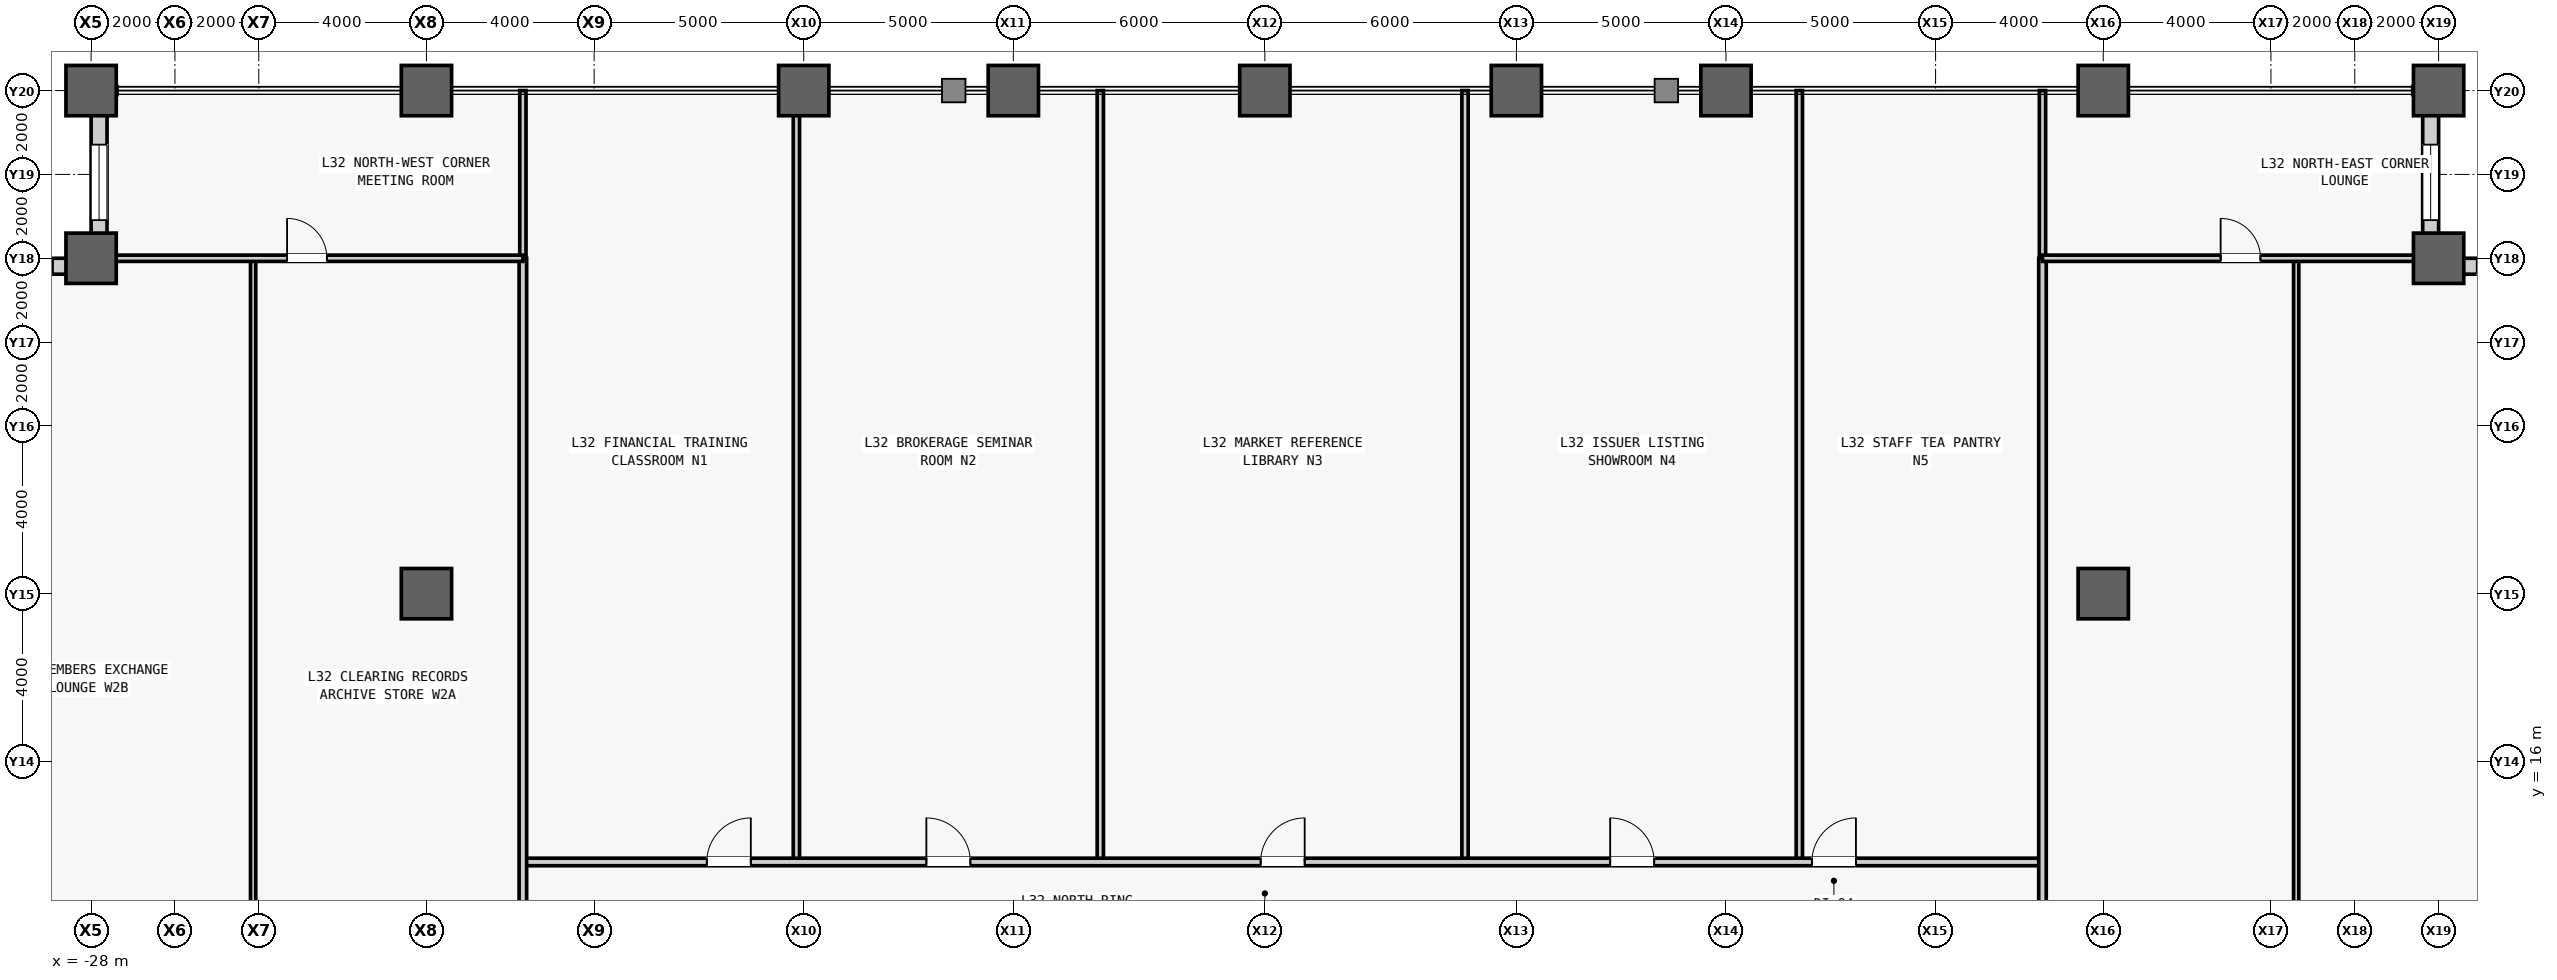
"""IFC4 building model, lengths in metres.
Left out: names, types, materials, properties, quantities, classifications, styles, units other than length and angle.
Written with IfcOpenShell. Run it as: python <this file> out.ifc"""

import sys

from ifc_helpers import new_model, si_unit, direction, frame, frame_2d, origin, origin_2d, place, context, subcontext, project, spatial, rectangle, hollow_rectangle, extrude, source, transform, mapped, element, fill, save


model = new_model("IFC4")
c1 = context("Model", 3, precision=1e-05, world=origin(), true_north=direction((0.0, 1.0)))
c2 = subcontext(c1, "Body", "Model", "MODEL_VIEW")
j1 = project(units=[si_unit("LENGTHUNIT", "METRE"), si_unit("PLANEANGLEUNIT", "RADIAN")], contexts=[c1])
p1 = place(None, origin())
s1 = spatial("IfcSite", under=j1, at=p1, CompositionType="ELEMENT")
p2 = place(p1, origin())
s2 = spatial("IfcBuilding", under=s1, at=p2, CompositionType="ELEMENT")
p3 = place(p2, frame((0.0, 0.0, 140.6)))
s3 = spatial("IfcBuildingStorey", under=s2, at=p3, CompositionType="ELEMENT", Elevation=140.6)
m1 = source(origin(), c2, "Body", "SweptSolid", [
    extrude(hollow_rectangle(XDim=1.2, YDim=1.2, WallThickness=0.07, at=origin_2d()), origin(), (0.0, 0.0, 1.0), 4.1),
])
for number, where, z_axis, x_axis in (
    (1, (-28.0, 28.0, 0.0), (0.0, 0.0, 1.0), (1.0, 0.0, 0.0)),
    (2, (-28.0, 32.0, 0.0), (0.0, 0.0, 1.0), (1.0, 0.0, 0.0)),
    (3, (-20.0, 20.0, 0.0), (0.0, 0.0, 1.0), (1.0, 0.0, 0.0)),
    (4, (-20.0, 32.0, 0.0), (0.0, 0.0, 1.0), (1.0, 0.0, 0.0)),
    (5, (-11.0, 32.0, 0.0), (0.0, 0.0, 1.0), (1.0, 0.0, 0.0)),
    (6, (-6.0, 32.0, 0.0), (0.0, 0.0, 1.0), (1.0, 0.0, 0.0)),
    (7, (0.0, 32.0, 0.0), (0.0, 0.0, 1.0), (1.0, 0.0, 0.0)),
    (8, (6.0, 32.0, 0.0), (0.0, 0.0, 1.0), (1.0, 0.0, 0.0)),
    (9, (11.0, 32.0, 0.0), (0.0, 0.0, 1.0), (1.0, 0.0, 0.0)),
    (10, (20.0, 20.0, 0.0), (0.0, 0.0, 1.0), (1.0, 0.0, 0.0)),
    (11, (20.0, 32.0, 0.0), (0.0, 0.0, 1.0), (1.0, 0.0, 0.0)),
    (12, (28.0, 28.0, 0.0), (0.0, 0.0, 1.0), (1.0, 0.0, 0.0)),
    (13, (28.0, 32.0, 0.0), (0.0, 0.0, 1.0), (1.0, 0.0, 0.0)),
):
    element("IfcColumn", number, at=place(p3, frame(where, z_axis=z_axis, x_axis=x_axis)), inside=s3, PredefinedType="COLUMN", context=c2, shape_type="MappedRepresentation", body=[
        mapped(m1, transform((0.0, 0.0, 0.0), scale=1.0)),
    ])
m2 = source(origin(), c2, "Body", "SweptSolid", [
    extrude(rectangle(XDim=3.62, YDim=0.38, at=frame_2d((1.81, 0.0))), origin(), (0.0, 0.0, 1.0), 3.145),
])
p4 = place(p3, frame((28.0, 27.81, 0.0), z_axis=(0.0, 0.0, 1.0), x_axis=(1.0, 0.0, 0.0)))
e14 = element("IfcWall", 14, at=p4, inside=s3, PredefinedType="STANDARD", context=c2, shape_type="MappedRepresentation", body=[
    mapped(m2, transform((0.0, 0.0, 0.0), scale=1.0)),
])
m3 = source(origin(), c2, "Body", "SweptSolid", [
    extrude(rectangle(XDim=1.8, YDim=2.4, at=frame_2d((0.9, 1.2))), frame((0.0, 0.2, 0.0), z_axis=(0.0, -1.0, 0.0), x_axis=(1.0, 0.0, 0.0)), (0.0, 0.0, 1.0), 0.4),
])
p5 = place(p4, frame((0.91, 0.0, 0.5)))
e15 = element("IfcOpeningElement", 15, at=p5, cuts=e14, PredefinedType="OPENING", context=c2, shape_type="MappedRepresentation", body=[
    mapped(m3, transform((0.0, 0.0, 0.0), scale=1.0)),
])
p6 = place(p3, frame((27.81, 28.0, 0.0), z_axis=(0.0, 0.0, 1.0), x_axis=(0.0, 1.0, 0.0)))
e16 = element("IfcWall", 16, at=p6, inside=s3, PredefinedType="STANDARD", context=c2, shape_type="MappedRepresentation", body=[
    mapped(m2, transform((0.0, 0.0, 0.0), scale=1.0)),
])
p7 = place(p6, frame((0.91, 0.0, 0.5)))
e17 = element("IfcOpeningElement", 17, at=p7, cuts=e16, PredefinedType="OPENING", context=c2, shape_type="MappedRepresentation", body=[
    mapped(m3, transform((0.0, 0.0, 0.0), scale=1.0)),
])
p8 = place(p3, frame((-27.81, 28.0, 0.0), z_axis=(0.0, 0.0, 1.0), x_axis=(0.0, 1.0, 0.0)))
e18 = element("IfcWall", 18, at=p8, inside=s3, PredefinedType="STANDARD", context=c2, shape_type="MappedRepresentation", body=[
    mapped(m2, transform((0.0, 0.0, 0.0), scale=1.0)),
])
p9 = place(p8, frame((0.91, 0.0, 0.5)))
e19 = element("IfcOpeningElement", 19, at=p9, cuts=e18, PredefinedType="OPENING", context=c2, shape_type="MappedRepresentation", body=[
    mapped(m3, transform((0.0, 0.0, 0.0), scale=1.0)),
])
p10 = place(p3, frame((-28.0, 27.81, 0.0), z_axis=(0.0, 0.0, 1.0), x_axis=(-1.0, 0.0, 0.0)))
e20 = element("IfcWall", 20, at=p10, inside=s3, PredefinedType="STANDARD", context=c2, shape_type="MappedRepresentation", body=[
    mapped(m2, transform((0.0, 0.0, 0.0), scale=1.0)),
])
p11 = place(p10, frame((0.91, 0.0, 0.5)))
e21 = element("IfcOpeningElement", 21, at=p11, cuts=e20, PredefinedType="OPENING", context=c2, shape_type="MappedRepresentation", body=[
    mapped(m3, transform((0.0, 0.0, 0.0), scale=1.0)),
])
m4 = source(origin(), c2, "Body", "SweptSolid", [
    extrude(rectangle(XDim=18.4, YDim=0.15, at=frame_2d((9.2, 0.0))), origin(), (0.0, 0.0, 1.0), 2.987),
])
p12 = place(p3, frame((-11.175, 13.6, 0.0), z_axis=(0.0, 0.0, 1.0), x_axis=(0.0, 1.0, 0.0)))
e22 = element("IfcWall", 22, at=p12, inside=s3, PredefinedType="PARTITIONING", context=c2, shape_type="MappedRepresentation", body=[
    mapped(m4, transform((0.0, 0.0, 0.0), scale=1.0)),
])
m5 = source(origin(), c2, "Body", "SweptSolid", [
    extrude(rectangle(XDim=18.4, YDim=0.15, at=frame_2d((9.2, 0.0))), origin(), (0.0, 0.0, 1.0), 3.84),
])
for number, where, z_axis, x_axis in (
    (23, (-3.925, 13.6, 0.0), (0.0, 0.0, 1.0), (0.0, 1.0, 0.0)),
    (24, (4.775, 13.6, 0.0), (0.0, 0.0, 1.0), (0.0, 1.0, 0.0)),
    (25, (12.75, 13.6, 0.0), (0.0, 0.0, 1.0), (0.0, 1.0, 0.0)),
):
    element("IfcWall", number, at=place(p3, frame(where, z_axis=z_axis, x_axis=x_axis)), inside=s3, PredefinedType="PARTITIONING", context=c2, shape_type="MappedRepresentation", body=[
        mapped(m5, transform((0.0, 0.0, 0.0), scale=1.0)),
    ])
m6 = source(origin(), c2, "Body", "SweptSolid", [
    extrude(rectangle(XDim=36.25, YDim=0.18, at=frame_2d((18.125, 0.0))), origin(), (0.0, 0.0, 1.0), 3.84),
])
p13 = place(p3, frame((-17.7, 13.6, 0.0), z_axis=(0.0, 0.0, 1.0), x_axis=(1.0, 0.0, 0.0)))
e26 = element("IfcWall", 26, at=p13, inside=s3, PredefinedType="PARTITIONING", context=c2, shape_type="MappedRepresentation", body=[
    mapped(m6, transform((0.0, 0.0, 0.0), scale=1.0)),
])
m7 = source(origin(), c2, "Body", "SweptSolid", [
    extrude(rectangle(XDim=1.05, YDim=2.2, at=frame_2d((0.525, 1.1))), frame((0.0, 0.1, 0.0), z_axis=(0.0, -1.0, 0.0), x_axis=(1.0, 0.0, 0.0)), (0.0, 0.0, 1.0), 0.2),
])
p14 = place(p13, frame((4.387, 0.0, 0.0)))
e27 = element("IfcOpeningElement", 27, at=p14, cuts=e26, PredefinedType="OPENING", context=c2, shape_type="MappedRepresentation", body=[
    mapped(m7, transform((0.0, 0.0, 0.0), scale=1.0)),
])
p15 = place(p13, frame((9.625, 0.0, 0.0)))
e28 = element("IfcOpeningElement", 28, at=p15, cuts=e26, PredefinedType="OPENING", context=c2, shape_type="MappedRepresentation", body=[
    mapped(m7, transform((0.0, 0.0, 0.0), scale=1.0)),
])
p16 = place(p13, frame((17.6, 0.0, 0.0)))
e29 = element("IfcOpeningElement", 29, at=p16, cuts=e26, PredefinedType="OPENING", context=c2, shape_type="MappedRepresentation", body=[
    mapped(m7, transform((0.0, 0.0, 0.0), scale=1.0)),
])
p17 = place(p13, frame((25.938, 0.0, 0.0)))
e30 = element("IfcOpeningElement", 30, at=p17, cuts=e26, PredefinedType="OPENING", context=c2, shape_type="MappedRepresentation", body=[
    mapped(m7, transform((0.0, 0.0, 0.0), scale=1.0)),
])
p18 = place(p13, frame((30.75, 0.0, 0.0)))
e31 = element("IfcOpeningElement", 31, at=p18, cuts=e26, PredefinedType="OPENING", context=c2, shape_type="MappedRepresentation", body=[
    mapped(m7, transform((0.0, 0.0, 0.0), scale=1.0)),
])
m8 = source(origin(), c2, "Body", "SweptSolid", [
    extrude(rectangle(XDim=4.0, YDim=0.15, at=frame_2d((2.0, 0.0))), origin(), (0.0, 0.0, 1.0), 3.84),
])
for number, where, z_axis, x_axis in (
    (32, (-17.7, 28.0, 0.0), (0.0, 0.0, 1.0), (0.0, 1.0, 0.0)),
    (33, (18.55, 28.0, 0.0), (0.0, 0.0, 1.0), (0.0, 1.0, 0.0)),
):
    element("IfcWall", number, at=place(p3, frame(where, z_axis=z_axis, x_axis=x_axis)), inside=s3, PredefinedType="PARTITIONING", context=c2, shape_type="MappedRepresentation", body=[
        mapped(m8, transform((0.0, 0.0, 0.0), scale=1.0)),
    ])
m9 = source(origin(), c2, "Body", "SweptSolid", [
    extrude(rectangle(XDim=26.912, YDim=0.125, at=frame_2d((13.456, 0.0))), origin(), (0.0, 0.0, 1.0), 3.84),
])
p19 = place(p3, frame((-24.135, 1.088, 0.0), z_axis=(0.0, 0.0, 1.0), x_axis=(0.0, 1.0, 0.0)))
e34 = element("IfcWall", 34, at=p19, inside=s3, PredefinedType="PARTITIONING", context=c2, shape_type="MappedRepresentation", body=[
    mapped(m9, transform((0.0, 0.0, 0.0), scale=1.0)),
])
m10 = source(origin(), c2, "Body", "SweptSolid", [
    extrude(rectangle(XDim=0.95, YDim=2.15, at=frame_2d((0.475, 1.075))), frame((0.0, 0.073, 0.0), z_axis=(0.0, -1.0, 0.0), x_axis=(1.0, 0.0, 0.0)), (0.0, 0.0, 1.0), 0.145),
])
p20 = place(p19, frame((5.781, 0.0, 0.0)))
e35 = element("IfcOpeningElement", 35, at=p20, cuts=e34, PredefinedType="OPENING", context=c2, shape_type="MappedRepresentation", body=[
    mapped(m10, transform((0.0, 0.0, 0.0), scale=1.0)),
])
m11 = source(origin(), c2, "Body", "SweptSolid", [
    extrude(rectangle(XDim=56.0, YDim=0.18, at=frame_2d((28.0, 0.0))), origin(), (0.0, 0.0, 1.0), 3.84),
])
p21 = place(p3, frame((-17.7, -28.0, 0.0), z_axis=(0.0, 0.0, 1.0), x_axis=(0.0, 1.0, 0.0)))
e36 = element("IfcWall", 36, at=p21, inside=s3, PredefinedType="PARTITIONING", context=c2, shape_type="MappedRepresentation", body=[
    mapped(m11, transform((0.0, 0.0, 0.0), scale=1.0)),
])
m12 = source(origin(), c2, "Body", "SweptSolid", [
    extrude(rectangle(XDim=0.95, YDim=2.15, at=frame_2d((0.475, 1.075))), frame((0.0, 0.1, 0.0), z_axis=(0.0, -1.0, 0.0), x_axis=(1.0, 0.0, 0.0)), (0.0, 0.0, 1.0), 0.2),
])
p22 = place(p21, frame((21.569, 0.0, 0.0)))
e37 = element("IfcOpeningElement", 37, at=p22, cuts=e36, PredefinedType="OPENING", context=c2, shape_type="MappedRepresentation", body=[
    mapped(m12, transform((0.0, 0.0, 0.0), scale=1.0)),
])
p23 = place(p21, frame((34.569, 0.0, 0.0)))
e38 = element("IfcOpeningElement", 38, at=p23, cuts=e36, PredefinedType="OPENING", context=c2, shape_type="MappedRepresentation", body=[
    mapped(m12, transform((0.0, 0.0, 0.0), scale=1.0)),
])
m13 = source(origin(), c2, "Body", "SweptSolid", [
    extrude(rectangle(XDim=56.0, YDim=0.125, at=frame_2d((28.0, 0.0))), origin(), (0.0, 0.0, 1.0), 3.84),
])
p24 = place(p3, frame((24.603, -28.0, 0.0), z_axis=(0.0, 0.0, 1.0), x_axis=(0.0, 1.0, 0.0)))
e39 = element("IfcWall", 39, at=p24, inside=s3, PredefinedType="PARTITIONING", context=c2, shape_type="MappedRepresentation", body=[
    mapped(m13, transform((0.0, 0.0, 0.0), scale=1.0)),
])
p25 = place(p24, frame((27.525, 0.0, 0.0)))
e40 = element("IfcOpeningElement", 40, at=p25, cuts=e39, PredefinedType="OPENING", context=c2, shape_type="MappedRepresentation", body=[
    mapped(m10, transform((0.0, 0.0, 0.0), scale=1.0)),
])
p26 = place(p3, frame((18.55, -28.0, 0.0), z_axis=(0.0, 0.0, 1.0), x_axis=(0.0, 1.0, 0.0)))
e41 = element("IfcWall", 41, at=p26, inside=s3, PredefinedType="PARTITIONING", context=c2, shape_type="MappedRepresentation", body=[
    mapped(m11, transform((0.0, 0.0, 0.0), scale=1.0)),
])
p27 = place(p26, frame((27.525, 0.0, 0.0)))
e42 = element("IfcOpeningElement", 42, at=p27, cuts=e41, PredefinedType="OPENING", context=c2, shape_type="MappedRepresentation", body=[
    mapped(m12, transform((0.0, 0.0, 0.0), scale=1.0)),
])
m14 = source(origin(), c2, "Body", "SweptSolid", [
    extrude(rectangle(XDim=10.3, YDim=0.15, at=frame_2d((5.15, 0.0))), origin(), (0.0, 0.0, 1.0), 3.84),
])
p28 = place(p3, frame((-28.0, 28.0, 0.0), z_axis=(0.0, 0.0, 1.0), x_axis=(1.0, 0.0, 0.0)))
e43 = element("IfcWall", 43, at=p28, inside=s3, PredefinedType="PARTITIONING", context=c2, shape_type="MappedRepresentation", body=[
    mapped(m14, transform((0.0, 0.0, 0.0), scale=1.0)),
])
m15 = source(origin(), c2, "Body", "SweptSolid", [
    extrude(rectangle(XDim=0.95, YDim=2.15, at=frame_2d((0.475, 1.075))), frame((0.0, 0.085, 0.0), z_axis=(0.0, -1.0, 0.0), x_axis=(1.0, 0.0, 0.0)), (0.0, 0.0, 1.0), 0.17),
])
p29 = place(p28, frame((4.675, 0.0, 0.0)))
e44 = element("IfcOpeningElement", 44, at=p29, cuts=e43, PredefinedType="OPENING", context=c2, shape_type="MappedRepresentation", body=[
    mapped(m15, transform((0.0, 0.0, 0.0), scale=1.0)),
])
m16 = source(origin(), c2, "Body", "SweptSolid", [
    extrude(rectangle(XDim=9.45, YDim=0.15, at=frame_2d((4.725, 0.0))), origin(), (0.0, 0.0, 1.0), 3.84),
])
p30 = place(p3, frame((18.55, 28.0, 0.0), z_axis=(0.0, 0.0, 1.0), x_axis=(1.0, 0.0, 0.0)))
e45 = element("IfcWall", 45, at=p30, inside=s3, PredefinedType="PARTITIONING", context=c2, shape_type="MappedRepresentation", body=[
    mapped(m16, transform((0.0, 0.0, 0.0), scale=1.0)),
])
p31 = place(p30, frame((4.25, 0.0, 0.0)))
e46 = element("IfcOpeningElement", 46, at=p31, cuts=e45, PredefinedType="OPENING", context=c2, shape_type="MappedRepresentation", body=[
    mapped(m15, transform((0.0, 0.0, 0.0), scale=1.0)),
])
m17 = source(origin(), c2, "Body", "SweptSolid", [
    extrude(rectangle(XDim=1.8, YDim=2.4, at=frame_2d((0.9, 1.2))), frame((0.0, 0.03, 0.0), z_axis=(0.0, -1.0, 0.0), x_axis=(1.0, 0.0, 0.0)), (0.0, 0.0, 1.0), 0.06),
])
p32 = place(p5, origin())
e47 = element("IfcWindow", 47, at=p32, inside=s3, PartitioningType="SINGLE_PANEL", PredefinedType="WINDOW", context=c2, shape_type="MappedRepresentation", body=[
    mapped(m17, transform((0.0, 0.0, 0.0), scale=1.0)),
])
fill(e15, e47)
p33 = place(p7, origin())
e48 = element("IfcWindow", 48, at=p33, inside=s3, PartitioningType="SINGLE_PANEL", PredefinedType="WINDOW", context=c2, shape_type="MappedRepresentation", body=[
    mapped(m17, transform((0.0, 0.0, 0.0), scale=1.0)),
])
fill(e17, e48)
p34 = place(p9, origin())
e49 = element("IfcWindow", 49, at=p34, inside=s3, PartitioningType="SINGLE_PANEL", PredefinedType="WINDOW", context=c2, shape_type="MappedRepresentation", body=[
    mapped(m17, transform((0.0, 0.0, 0.0), scale=1.0)),
])
fill(e19, e49)
p35 = place(p11, origin())
e50 = element("IfcWindow", 50, at=p35, inside=s3, PartitioningType="SINGLE_PANEL", PredefinedType="WINDOW", context=c2, shape_type="MappedRepresentation", body=[
    mapped(m17, transform((0.0, 0.0, 0.0), scale=1.0)),
])
fill(e21, e50)
m18 = source(origin(), c2, "Body", "SweptSolid", [
    extrude(rectangle(XDim=1.05, YDim=2.2, at=frame_2d((0.525, 1.1))), frame((0.0, 0.025, 0.0), z_axis=(0.0, -1.0, 0.0), x_axis=(1.0, 0.0, 0.0)), (0.0, 0.0, 1.0), 0.05),
])
p36 = place(p14, origin())
e51 = element("IfcDoor", 51, at=p36, inside=s3, OperationType="SINGLE_SWING_RIGHT", PredefinedType="DOOR", context=c2, shape_type="MappedRepresentation", body=[
    mapped(m18, transform((0.0, 0.0, 0.0), scale=1.0)),
])
fill(e27, e51)
p37 = place(p15, origin())
e52 = element("IfcDoor", 52, at=p37, inside=s3, OperationType="SINGLE_SWING_LEFT", PredefinedType="DOOR", context=c2, shape_type="MappedRepresentation", body=[
    mapped(m18, transform((0.0, 0.0, 0.0), scale=1.0)),
])
fill(e28, e52)
p38 = place(p16, origin())
e53 = element("IfcDoor", 53, at=p38, inside=s3, OperationType="SINGLE_SWING_RIGHT", PredefinedType="DOOR", context=c2, shape_type="MappedRepresentation", body=[
    mapped(m18, transform((0.0, 0.0, 0.0), scale=1.0)),
])
fill(e29, e53)
p39 = place(p17, origin())
e54 = element("IfcDoor", 54, at=p39, inside=s3, OperationType="SINGLE_SWING_LEFT", PredefinedType="DOOR", context=c2, shape_type="MappedRepresentation", body=[
    mapped(m18, transform((0.0, 0.0, 0.0), scale=1.0)),
])
fill(e30, e54)
p40 = place(p18, origin())
e55 = element("IfcDoor", 55, at=p40, inside=s3, OperationType="SINGLE_SWING_RIGHT", PredefinedType="DOOR", context=c2, shape_type="MappedRepresentation", body=[
    mapped(m18, transform((0.0, 0.0, 0.0), scale=1.0)),
])
fill(e31, e55)
m19 = source(origin(), c2, "Body", "SweptSolid", [
    extrude(rectangle(XDim=0.95, YDim=2.15, at=frame_2d((0.475, 1.075))), frame((0.0, 0.025, 0.0), z_axis=(0.0, -1.0, 0.0), x_axis=(1.0, 0.0, 0.0)), (0.0, 0.0, 1.0), 0.05),
])
p41 = place(p29, origin())
e56 = element("IfcDoor", 56, at=p41, inside=s3, OperationType="SINGLE_SWING_LEFT", PredefinedType="DOOR", context=c2, shape_type="MappedRepresentation", body=[
    mapped(m19, transform((0.0, 0.0, 0.0), scale=1.0)),
])
fill(e44, e56)
p42 = place(p31, origin())
e57 = element("IfcDoor", 57, at=p42, inside=s3, OperationType="SINGLE_SWING_LEFT", PredefinedType="DOOR", context=c2, shape_type="MappedRepresentation", body=[
    mapped(m19, transform((0.0, 0.0, 0.0), scale=1.0)),
])
fill(e46, e57)
save(model, sys.argv[1])
